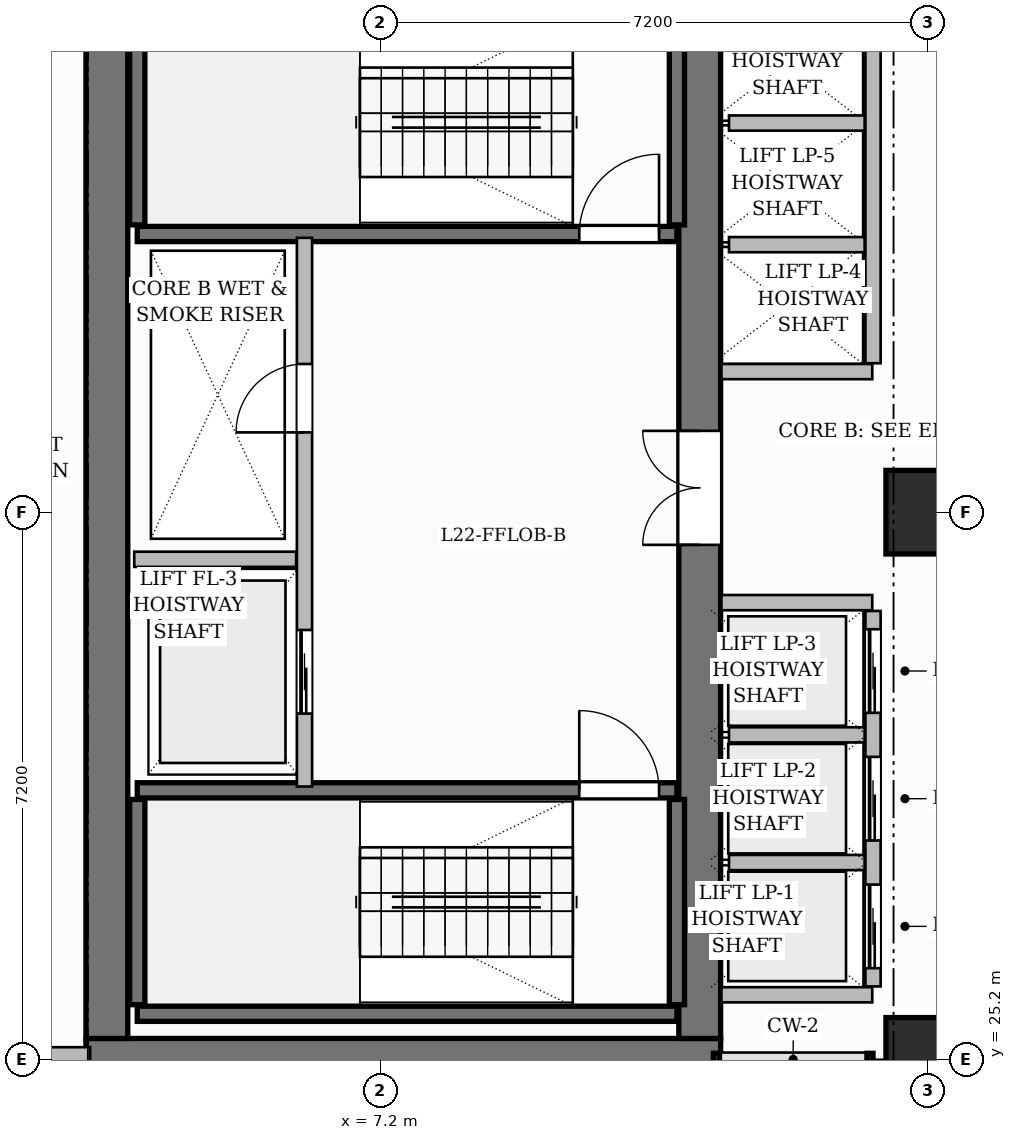
"""IFC4 building model, lengths in metres.
Left out: names, types, materials, properties, quantities, classifications, styles, units other than length and angle.
Written with IfcOpenShell. Run it as: python <this file> out.ifc"""

import sys

from ifc_helpers import new_model, si_unit, direction, frame, frame_2d, origin, origin_2d, place, context, subcontext, project, spatial, rectangle, extrude, source, transform, mapped, element, fill, save


model = new_model("IFC4")
c1 = context("Model", 3, precision=1e-05, world=origin(), true_north=direction((0.0, 1.0)))
c2 = subcontext(c1, "Body", "Model", "MODEL_VIEW")
j1 = project(units=[si_unit("LENGTHUNIT", "METRE"), si_unit("PLANEANGLEUNIT", "RADIAN")], contexts=[c1])
p1 = place(None, origin())
s1 = spatial("IfcSite", under=j1, at=p1, CompositionType="ELEMENT")
p2 = place(p1, origin())
s2 = spatial("IfcBuilding", under=s1, at=p2, CompositionType="ELEMENT")
p3 = place(p2, frame((0.0, 0.0, 91.6)))
s3 = spatial("IfcBuildingStorey", under=s2, at=p3, CompositionType="ELEMENT", Elevation=91.6)
p4 = place(p3, frame((3.325, 25.2, 0.0), z_axis=(0.0, 0.0, 1.0), x_axis=(1.0, 0.0, 0.0)))
e1 = element("IfcWall", 1, at=p4, inside=s3, PredefinedType="SHEAR", context=c2, shape_type="SweptSolid", body=[
    extrude(rectangle(XDim=8.35, YDim=0.55, at=frame_2d((4.175, 0.0))), origin(), (0.0, 0.0, 1.0), 3.7),
])
p5 = place(p3, frame((3.6, 25.475, 0.0), z_axis=(0.0, 0.0, 1.0), x_axis=(0.0, 1.0, 0.0)))
e2 = element("IfcWall", 2, at=p5, inside=s3, PredefinedType="SHEAR", context=c2, shape_type="SweptSolid", body=[
    extrude(rectangle(XDim=13.85, YDim=0.55, at=frame_2d((6.925, 0.0))), origin(), (0.0, 0.0, 1.0), 3.7),
])
p6 = place(p3, frame((11.4, 25.475, 0.0), z_axis=(0.0, 0.0, 1.0), x_axis=(0.0, 1.0, 0.0)))
e3 = element("IfcWall", 3, at=p6, inside=s3, PredefinedType="SHEAR", context=c2, shape_type="SweptSolid", body=[
    extrude(rectangle(XDim=13.85, YDim=0.55, at=frame_2d((6.925, 0.0))), origin(), (0.0, 0.0, 1.0), 3.7),
])
p7 = place(p6, frame((6.495, 0.0, 0.0)))
e4 = element("IfcOpeningElement", 4, at=p7, cuts=e3, PredefinedType="OPENING", context=c2, shape_type="SweptSolid", body=[
    extrude(rectangle(XDim=1.5, YDim=2.2, at=frame_2d((0.75, 1.1))), frame((0.0, 0.285, 0.0), z_axis=(0.0, -1.0, 0.0), x_axis=(1.0, 0.0, 0.0)), (0.0, 0.0, 1.0), 0.57),
])
m1 = source(origin(), c2, "Body", "SweptSolid", [
    extrude(rectangle(XDim=1.1, YDim=1.1, at=origin_2d()), origin(), (0.0, 0.0, 1.0), 3.7),
])
for number, where, z_axis, x_axis in (
    (5, (14.4, 25.2, 0.0), (0.0, 0.0, 1.0), (1.0, 0.0, 0.0)),
    (6, (14.4, 32.4, 0.0), (0.0, 0.0, 1.0), (1.0, 0.0, 0.0)),
):
    element("IfcColumn", number, at=place(p3, frame(where, z_axis=z_axis, x_axis=x_axis)), inside=s3, PredefinedType="COLUMN", context=c2, shape_type="MappedRepresentation", body=[
        mapped(m1, transform((0.0, 0.0, 0.0), scale=1.0)),
    ])
p8 = place(p3, frame((4.0, 25.8, 0.0), z_axis=(0.0, 0.0, 1.0), x_axis=(1.0, 0.0, 0.0)))
e7 = element("IfcWall", 7, at=p8, inside=s3, PredefinedType="SHEAR", context=c2, shape_type="SweptSolid", body=[
    extrude(rectangle(XDim=7.1, YDim=0.2, at=frame_2d((3.55, 0.0))), origin(), (0.0, 0.0, 1.0), 3.7),
])
for number, where, z_axis, x_axis in (
    (8, (4.0, 25.92, 0.0), (0.0, 0.0, 1.0), (0.0, 1.0, 0.0)),
    (9, (11.1, 25.92, 0.0), (0.0, 0.0, 1.0), (0.0, 1.0, 0.0)),
):
    element("IfcWall", number, at=place(p3, frame(where, z_axis=z_axis, x_axis=x_axis)), inside=s3, PredefinedType="SHEAR", context=c2, shape_type="SweptSolid", body=[
        extrude(rectangle(XDim=2.7, YDim=0.2, at=frame_2d((1.35, 0.0))), origin(), (0.0, 0.0, 1.0), 3.7),
    ])
p9 = place(p3, frame((4.0, 28.74, 0.0), z_axis=(0.0, 0.0, 1.0), x_axis=(1.0, 0.0, 0.0)))
e10 = element("IfcWall", 10, at=p9, inside=s3, PredefinedType="SHEAR", context=c2, shape_type="SweptSolid", body=[
    extrude(rectangle(XDim=7.1, YDim=0.2, at=frame_2d((3.55, 0.0))), origin(), (0.0, 0.0, 1.0), 3.7),
])
p10 = place(p9, frame((5.815, 0.0, 0.0)))
e11 = element("IfcOpeningElement", 11, at=p10, cuts=e10, PredefinedType="OPENING", context=c2, shape_type="SweptSolid", body=[
    extrude(rectangle(XDim=1.05, YDim=2.2, at=frame_2d((0.525, 1.1))), frame((0.0, 0.11, 0.0), z_axis=(0.0, -1.0, 0.0), x_axis=(1.0, 0.0, 0.0)), (0.0, 0.0, 1.0), 0.22),
])
for number, where, z_axis, x_axis in (
    (12, (4.0, 36.18, 0.0), (0.0, 0.0, 1.0), (0.0, 1.0, 0.0)),
    (13, (11.1, 36.18, 0.0), (0.0, 0.0, 1.0), (0.0, 1.0, 0.0)),
):
    element("IfcWall", number, at=place(p3, frame(where, z_axis=z_axis, x_axis=x_axis)), inside=s3, PredefinedType="SHEAR", context=c2, shape_type="SweptSolid", body=[
        extrude(rectangle(XDim=2.7, YDim=0.2, at=frame_2d((1.35, 0.0))), origin(), (0.0, 0.0, 1.0), 3.7),
    ])
p11 = place(p3, frame((4.0, 36.06, 0.0), z_axis=(0.0, 0.0, 1.0), x_axis=(1.0, 0.0, 0.0)))
e14 = element("IfcWall", 14, at=p11, inside=s3, PredefinedType="SHEAR", context=c2, shape_type="SweptSolid", body=[
    extrude(rectangle(XDim=7.1, YDim=0.2, at=frame_2d((3.55, 0.0))), origin(), (0.0, 0.0, 1.0), 3.7),
])
p12 = place(p11, frame((5.815, 0.0, 0.0)))
e15 = element("IfcOpeningElement", 15, at=p12, cuts=e14, PredefinedType="OPENING", context=c2, shape_type="SweptSolid", body=[
    extrude(rectangle(XDim=1.05, YDim=2.2, at=frame_2d((0.525, 1.1))), frame((0.0, 0.11, 0.0), z_axis=(0.0, -1.0, 0.0), x_axis=(1.0, 0.0, 0.0)), (0.0, 0.0, 1.0), 0.22),
])
p13 = place(p3, frame((6.2, 28.79, 0.0), z_axis=(0.0, 0.0, 1.0), x_axis=(0.0, 1.0, 0.0)))
e16 = element("IfcWall", 16, at=p13, inside=s3, PredefinedType="PARTITIONING", context=c2, shape_type="SweptSolid", body=[
    extrude(rectangle(XDim=7.22, YDim=0.2, at=frame_2d((3.61, 0.0))), origin(), (0.0, 0.0, 1.0), 3.45),
])
p14 = place(p13, frame((4.66, 0.0, 0.0)))
e17 = element("IfcOpeningElement", 17, at=p14, cuts=e16, PredefinedType="OPENING", context=c2, shape_type="SweptSolid", body=[
    extrude(rectangle(XDim=0.9, YDim=2.1, at=frame_2d((0.45, 1.05))), frame((0.0, 0.11, 0.0), z_axis=(0.0, -1.0, 0.0), x_axis=(1.0, 0.0, 0.0)), (0.0, 0.0, 1.0), 0.22),
])
p15 = place(p13, frame((0.96, 0.0, 0.0)))
e18 = element("IfcOpeningElement", 18, at=p15, cuts=e16, PredefinedType="OPENING", context=c2, shape_type="SweptSolid", body=[
    extrude(rectangle(XDim=1.1, YDim=2.2, at=frame_2d((0.55, 1.1))), frame((0.0, 0.11, 0.0), z_axis=(0.0, -1.0, 0.0), x_axis=(1.0, 0.0, 0.0)), (0.0, 0.0, 1.0), 0.22),
])
p16 = place(p3, frame((3.96, 31.78, 0.0), z_axis=(0.0, 0.0, 1.0), x_axis=(1.0, 0.0, 0.0)))
e19 = element("IfcWall", 19, at=p16, inside=s3, PredefinedType="PARTITIONING", context=c2, shape_type="SweptSolid", body=[
    extrude(rectangle(XDim=2.13, YDim=0.2, at=frame_2d((1.065, 0.0))), origin(), (0.0, 0.0, 1.0), 3.45),
])
for number, where, z_axis, x_axis in (
    (20, (11.685, 26.05, 0.0), (0.0, 0.0, 1.0), (1.0, 0.0, 0.0)),
    (21, (11.685, 31.21, 0.0), (0.0, 0.0, 1.0), (1.0, 0.0, 0.0)),
):
    element("IfcWall", number, at=place(p3, frame(where, z_axis=z_axis, x_axis=x_axis)), inside=s3, PredefinedType="PARTITIONING", context=c2, shape_type="SweptSolid", body=[
        extrude(rectangle(XDim=1.985, YDim=0.2, at=frame_2d((0.992, 0.0))), origin(), (0.0, 0.0, 1.0), 3.45),
    ])
p17 = place(p3, frame((13.68, 26.16, 0.0), z_axis=(0.0, 0.0, 1.0), x_axis=(0.0, 1.0, 0.0)))
e22 = element("IfcWall", 22, at=p17, inside=s3, PredefinedType="PARTITIONING", context=c2, shape_type="SweptSolid", body=[
    extrude(rectangle(XDim=4.94, YDim=0.2, at=frame_2d((2.47, 0.0))), origin(), (0.0, 0.0, 1.0), 3.45),
])
p18 = place(p17, frame((0.24, 0.0, 0.0)))
e23 = element("IfcOpeningElement", 23, at=p18, cuts=e22, PredefinedType="OPENING", context=c2, shape_type="SweptSolid", body=[
    extrude(rectangle(XDim=1.1, YDim=2.2, at=frame_2d((0.55, 1.1))), frame((0.0, 0.11, 0.0), z_axis=(0.0, -1.0, 0.0), x_axis=(1.0, 0.0, 0.0)), (0.0, 0.0, 1.0), 0.22),
])
p19 = place(p17, frame((1.92, 0.0, 0.0)))
e24 = element("IfcOpeningElement", 24, at=p19, cuts=e22, PredefinedType="OPENING", context=c2, shape_type="SweptSolid", body=[
    extrude(rectangle(XDim=1.1, YDim=2.2, at=frame_2d((0.55, 1.1))), frame((0.0, 0.11, 0.0), z_axis=(0.0, -1.0, 0.0), x_axis=(1.0, 0.0, 0.0)), (0.0, 0.0, 1.0), 0.22),
])
p20 = place(p17, frame((3.6, 0.0, 0.0)))
e25 = element("IfcOpeningElement", 25, at=p20, cuts=e22, PredefinedType="OPENING", context=c2, shape_type="SweptSolid", body=[
    extrude(rectangle(XDim=1.1, YDim=2.2, at=frame_2d((0.55, 1.1))), frame((0.0, 0.11, 0.0), z_axis=(0.0, -1.0, 0.0), x_axis=(1.0, 0.0, 0.0)), (0.0, 0.0, 1.0), 0.22),
])
for number, where, z_axis, x_axis in (
    (26, (11.785, 27.79, 0.0), (0.0, 0.0, 1.0), (1.0, 0.0, 0.0)),
    (27, (11.785, 29.47, 0.0), (0.0, 0.0, 1.0), (1.0, 0.0, 0.0)),
):
    element("IfcWall", number, at=place(p3, frame(where, z_axis=z_axis, x_axis=x_axis)), inside=s3, PredefinedType="PARTITIONING", context=c2, shape_type="SweptSolid", body=[
        extrude(rectangle(XDim=1.785, YDim=0.2, at=frame_2d((0.893, 0.0))), origin(), (0.0, 0.0, 1.0), 3.45),
    ])
p21 = place(p3, frame((11.685, 34.25, 0.0), z_axis=(0.0, 0.0, 1.0), x_axis=(1.0, 0.0, 0.0)))
e28 = element("IfcWall", 28, at=p21, inside=s3, PredefinedType="PARTITIONING", context=c2, shape_type="SweptSolid", body=[
    extrude(rectangle(XDim=1.985, YDim=0.2, at=frame_2d((0.992, 0.0))), origin(), (0.0, 0.0, 1.0), 3.45),
])
p22 = place(p3, frame((13.68, 34.36, 0.0), z_axis=(0.0, 0.0, 1.0), x_axis=(0.0, 1.0, 0.0)))
e29 = element("IfcWall", 29, at=p22, inside=s3, PredefinedType="PARTITIONING", context=c2, shape_type="SweptSolid", body=[
    extrude(rectangle(XDim=4.72, YDim=0.2, at=frame_2d((2.36, 0.0))), origin(), (0.0, 0.0, 1.0), 3.45),
])
for number, where, z_axis, x_axis in (
    (30, (11.785, 35.92, 0.0), (0.0, 0.0, 1.0), (1.0, 0.0, 0.0)),
    (31, (11.785, 37.52, 0.0), (0.0, 0.0, 1.0), (1.0, 0.0, 0.0)),
):
    element("IfcWall", number, at=place(p3, frame(where, z_axis=z_axis, x_axis=x_axis)), inside=s3, PredefinedType="PARTITIONING", context=c2, shape_type="SweptSolid", body=[
        extrude(rectangle(XDim=1.785, YDim=0.2, at=frame_2d((0.893, 0.0))), origin(), (0.0, 0.0, 1.0), 3.45),
    ])
p23 = place(p3, frame((0.0, 25.2, 0.0), z_axis=(0.0, 0.0, 1.0), x_axis=(1.0, 0.0, 0.0)))
e32 = element("IfcWall", 32, at=p23, inside=s3, PredefinedType="SOLIDWALL", context=c2, shape_type="SweptSolid", body=[
    extrude(rectangle(XDim=3.38, YDim=0.32, at=frame_2d((1.69, 0.0))), origin(), (0.0, 0.0, 1.0), 3.45),
])
p24 = place(p23, frame((1.205, 0.0, 0.8)))
e33 = element("IfcOpeningElement", 33, at=p24, cuts=e32, PredefinedType="OPENING", context=c2, shape_type="SweptSolid", body=[
    extrude(rectangle(XDim=1.4, YDim=1.85, at=frame_2d((0.7, 0.925))), frame((0.0, 0.17, 0.0), z_axis=(0.0, -1.0, 0.0), x_axis=(1.0, 0.0, 0.0)), (0.0, 0.0, 1.0), 0.34),
])
m2 = source(origin(), c2, "Body", "SweptSolid", [
    extrude(rectangle(XDim=1.05, YDim=2.2, at=frame_2d((0.525, 1.1))), frame((0.0, 0.025, 0.0), z_axis=(0.0, -1.0, 0.0), x_axis=(1.0, 0.0, 0.0)), (0.0, 0.0, 1.0), 0.05),
])
p25 = place(p10, origin())
e34 = element("IfcDoor", 34, at=p25, inside=s3, OperationType="SINGLE_SWING_LEFT", PredefinedType="DOOR", context=c2, shape_type="MappedRepresentation", body=[
    mapped(m2, transform((0.0, 0.0, 0.0), scale=1.0)),
])
fill(e11, e34)
p26 = place(p12, origin())
e35 = element("IfcDoor", 35, at=p26, inside=s3, OperationType="SINGLE_SWING_RIGHT", PredefinedType="DOOR", context=c2, shape_type="MappedRepresentation", body=[
    mapped(m2, transform((0.0, 0.0, 0.0), scale=1.0)),
])
fill(e15, e35)
m3 = source(origin(), c2, "Body", "SweptSolid", [
    extrude(rectangle(XDim=0.9, YDim=2.1, at=frame_2d((0.45, 1.05))), frame((0.0, 0.025, 0.0), z_axis=(0.0, -1.0, 0.0), x_axis=(1.0, 0.0, 0.0)), (0.0, 0.0, 1.0), 0.05),
])
p27 = place(p14, origin())
e36 = element("IfcDoor", 36, at=p27, inside=s3, OperationType="SINGLE_SWING_LEFT", PredefinedType="DOOR", context=c2, shape_type="MappedRepresentation", body=[
    mapped(m3, transform((0.0, 0.0, 0.0), scale=1.0)),
])
fill(e17, e36)
m4 = source(origin(), c2, "Body", "SweptSolid", [
    extrude(rectangle(XDim=1.5, YDim=2.2, at=frame_2d((0.75, 1.1))), frame((0.0, 0.025, 0.0), z_axis=(0.0, -1.0, 0.0), x_axis=(1.0, 0.0, 0.0)), (0.0, 0.0, 1.0), 0.05),
])
p28 = place(p7, origin())
e37 = element("IfcDoor", 37, at=p28, inside=s3, OperationType="DOUBLE_DOOR_SINGLE_SWING", PredefinedType="DOOR", context=c2, shape_type="MappedRepresentation", body=[
    mapped(m4, transform((0.0, 0.0, 0.0), scale=1.0)),
])
fill(e4, e37)
m5 = source(origin(), c2, "Body", "SweptSolid", [
    extrude(rectangle(XDim=1.1, YDim=2.2, at=frame_2d((0.55, 1.1))), frame((0.0, 0.025, 0.0), z_axis=(0.0, -1.0, 0.0), x_axis=(1.0, 0.0, 0.0)), (0.0, 0.0, 1.0), 0.05),
])
p29 = place(p15, origin())
e38 = element("IfcDoor", 38, at=p29, inside=s3, OperationType="SLIDING_TO_LEFT", PredefinedType="DOOR", context=c2, shape_type="MappedRepresentation", body=[
    mapped(m5, transform((0.0, 0.0, 0.0), scale=1.0)),
])
fill(e18, e38)
p30 = place(p18, origin())
e39 = element("IfcDoor", 39, at=p30, inside=s3, OperationType="SLIDING_TO_LEFT", PredefinedType="DOOR", context=c2, shape_type="MappedRepresentation", body=[
    mapped(m5, transform((0.0, 0.0, 0.0), scale=1.0)),
])
fill(e23, e39)
p31 = place(p19, origin())
e40 = element("IfcDoor", 40, at=p31, inside=s3, OperationType="SLIDING_TO_LEFT", PredefinedType="DOOR", context=c2, shape_type="MappedRepresentation", body=[
    mapped(m5, transform((0.0, 0.0, 0.0), scale=1.0)),
])
fill(e24, e40)
p32 = place(p20, origin())
e41 = element("IfcDoor", 41, at=p32, inside=s3, OperationType="SLIDING_TO_LEFT", PredefinedType="DOOR", context=c2, shape_type="MappedRepresentation", body=[
    mapped(m5, transform((0.0, 0.0, 0.0), scale=1.0)),
])
fill(e25, e41)
save(model, sys.argv[1])
